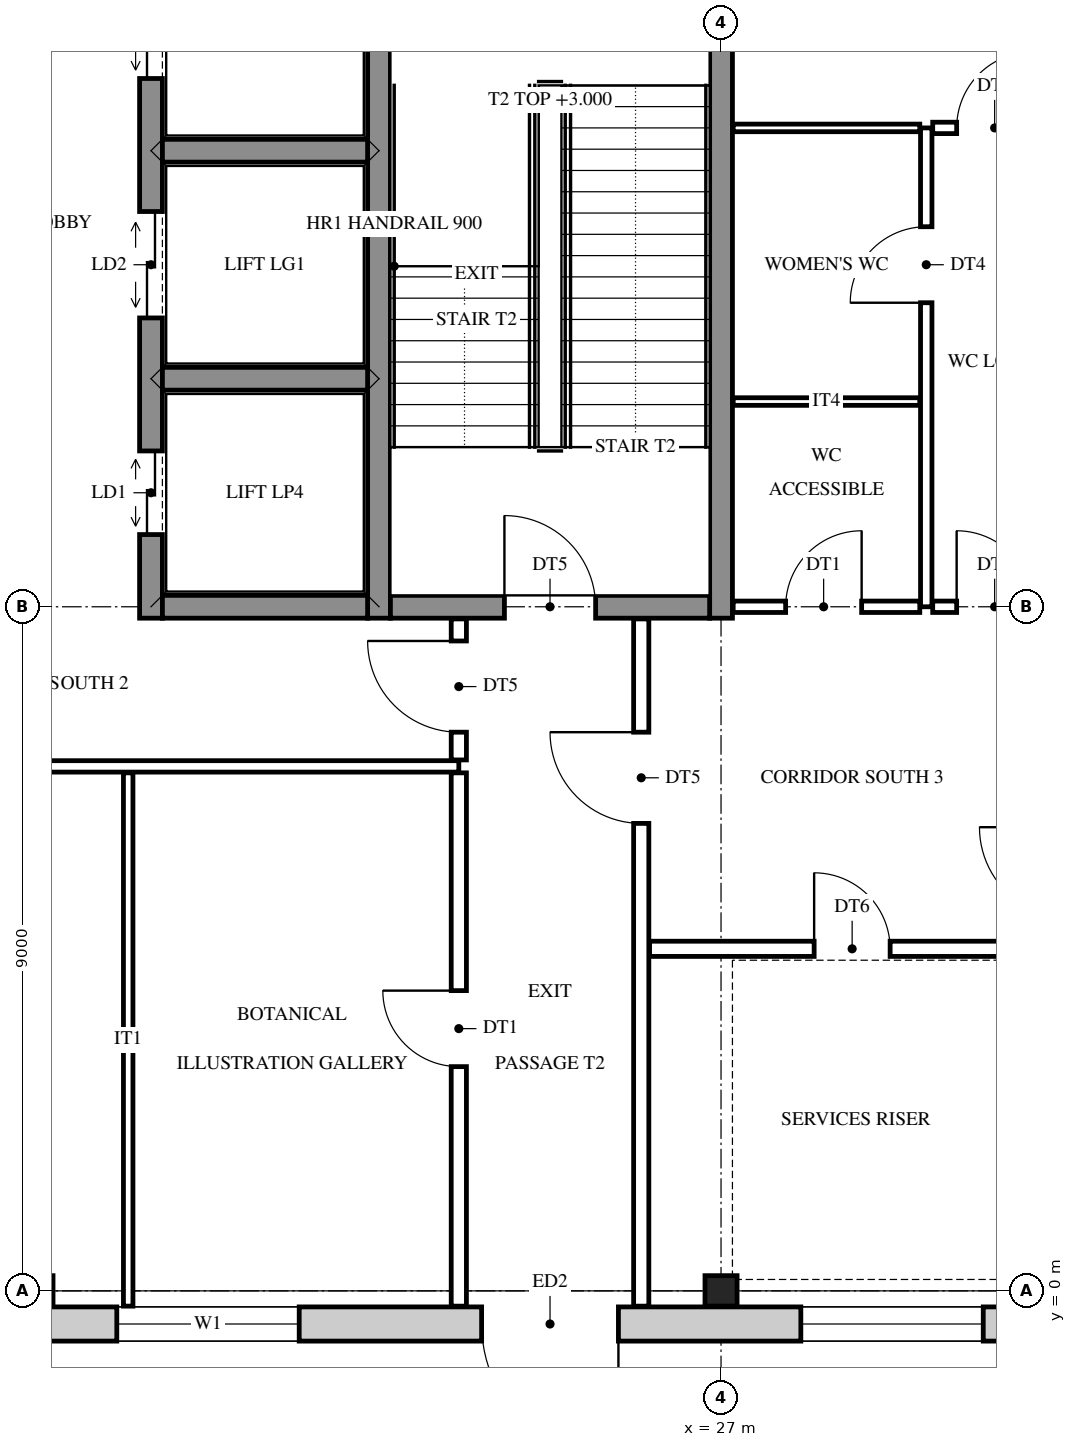
"""IFC4 building model, lengths in metres.
Left out: names, types, materials, properties, quantities, classifications, styles, units other than length and angle.
Written with IfcOpenShell. Run it as: python <this file> out.ifc"""

import sys

from ifc_helpers import new_model, si_unit, direction, frame, frame_2d, origin, origin_2d, place, context, subcontext, project, spatial, rectangle, i_section, extrude, element, fill, save


model = new_model("IFC4")
c1 = context("Model", 3, precision=1e-05, world=origin(), true_north=direction((0.0, 1.0)))
c2 = subcontext(c1, "Body", "Model", "MODEL_VIEW")
j1 = project(units=[si_unit("LENGTHUNIT", "METRE"), si_unit("PLANEANGLEUNIT", "RADIAN")], contexts=[c1])
p1 = place(None, origin())
s1 = spatial("IfcSite", under=j1, at=p1, CompositionType="ELEMENT")
p2 = place(p1, origin())
s2 = spatial("IfcBuilding", under=s1, at=p2, CompositionType="ELEMENT")
p3 = place(p2, origin())
s3 = spatial("IfcBuildingStorey", under=s2, at=p3, CompositionType="ELEMENT", Elevation=0.0)
for number, where, z_axis, x_axis in (
    (1, (18.0, 0.0, 0.0), (0.0, 0.0, 1.0), (0.0, 1.0, 0.0)),
    (2, (27.0, 0.0, 0.0), (0.0, 0.0, 1.0), (0.0, 1.0, 0.0)),
):
    element("IfcColumn", number, at=place(p3, frame(where, z_axis=z_axis, x_axis=x_axis)), inside=s3, PredefinedType="COLUMN", context=c2, shape_type="SweptSolid", body=[
        extrude(i_section(OverallWidth=0.4, OverallDepth=0.422, WebThickness=0.028, FlangeThickness=0.036, at=origin_2d()), origin(), (0.0, 0.0, 1.0), 6.0),
    ])
p4 = place(p3, frame((19.5, 8.85, 0.0), z_axis=(0.0, 0.0, 1.0), x_axis=(0.0, 1.0, 0.0)))
e3 = element("IfcWall", 3, at=p4, inside=s3, PredefinedType="SHEAR", context=c2, shape_type="SweptSolid", body=[
    extrude(rectangle(XDim=9.3, YDim=0.3, at=frame_2d((4.65, 0.0))), origin(), (0.0, 0.0, 1.0), 6.0),
])
p5 = place(p4, frame((1.1, 0.0, 0.0)))
e4 = element("IfcOpeningElement", 4, at=p5, cuts=e3, PredefinedType="OPENING", context=c2, shape_type="SweptSolid", body=[
    extrude(rectangle(XDim=1.1, YDim=2.1, at=frame_2d((0.55, 1.05))), frame((0.0, 0.16, 0.0), z_axis=(0.0, -1.0, 0.0), x_axis=(1.0, 0.0, 0.0)), (0.0, 0.0, 1.0), 0.32),
])
p6 = place(p4, frame((3.95, 0.0, 0.0)))
e5 = element("IfcOpeningElement", 5, at=p6, cuts=e3, PredefinedType="OPENING", context=c2, shape_type="SweptSolid", body=[
    extrude(rectangle(XDim=1.4, YDim=2.1, at=frame_2d((0.7, 1.05))), frame((0.0, 0.16, 0.0), z_axis=(0.0, -1.0, 0.0), x_axis=(1.0, 0.0, 0.0)), (0.0, 0.0, 1.0), 0.32),
])
p7 = place(p4, frame((7.1, 0.0, 0.0)))
e6 = element("IfcOpeningElement", 6, at=p7, cuts=e3, PredefinedType="OPENING", context=c2, shape_type="SweptSolid", body=[
    extrude(rectangle(XDim=1.1, YDim=2.1, at=frame_2d((0.55, 1.05))), frame((0.0, 0.16, 0.0), z_axis=(0.0, -1.0, 0.0), x_axis=(1.0, 0.0, 0.0)), (0.0, 0.0, 1.0), 0.32),
])
for number, where, z_axis, x_axis in (
    (7, (22.5, 8.85, 0.0), (0.0, 0.0, 1.0), (0.0, 1.0, 0.0)),
    (8, (27.0, 8.85, 0.0), (0.0, 0.0, 1.0), (0.0, 1.0, 0.0)),
):
    element("IfcWall", number, at=place(p3, frame(where, z_axis=z_axis, x_axis=x_axis)), inside=s3, PredefinedType="SHEAR", context=c2, shape_type="SweptSolid", body=[
        extrude(rectangle(XDim=9.3, YDim=0.3, at=frame_2d((4.65, 0.0))), origin(), (0.0, 0.0, 1.0), 6.0),
    ])
p8 = place(p3, frame((19.65, 9.0, 0.0), z_axis=(0.0, 0.0, 1.0), x_axis=(1.0, 0.0, 0.0)))
e9 = element("IfcWall", 9, at=p8, inside=s3, PredefinedType="SHEAR", context=c2, shape_type="SweptSolid", body=[
    extrude(rectangle(XDim=2.7, YDim=0.3, at=frame_2d((1.35, 0.0))), origin(), (0.0, 0.0, 1.0), 6.0),
])
p9 = place(p3, frame((22.65, 9.0, 0.0), z_axis=(0.0, 0.0, 1.0), x_axis=(1.0, 0.0, 0.0)))
e10 = element("IfcWall", 10, at=p9, inside=s3, PredefinedType="SHEAR", context=c2, shape_type="SweptSolid", body=[
    extrude(rectangle(XDim=4.2, YDim=0.3, at=frame_2d((2.1, 0.0))), origin(), (0.0, 0.0, 1.0), 6.0),
])
p10 = place(p9, frame((1.5, 0.0, 0.0)))
e11 = element("IfcOpeningElement", 11, at=p10, cuts=e10, PredefinedType="OPENING", context=c2, shape_type="SweptSolid", body=[
    extrude(rectangle(XDim=1.2, YDim=2.1, at=frame_2d((0.6, 1.05))), frame((0.0, 0.16, 0.0), z_axis=(0.0, -1.0, 0.0), x_axis=(1.0, 0.0, 0.0)), (0.0, 0.0, 1.0), 0.32),
])
for number, where, z_axis, x_axis in (
    (12, (19.65, 12.0, 0.0), (0.0, 0.0, 1.0), (1.0, 0.0, 0.0)),
    (13, (19.65, 15.0, 0.0), (0.0, 0.0, 1.0), (1.0, 0.0, 0.0)),
):
    element("IfcWall", number, at=place(p3, frame(where, z_axis=z_axis, x_axis=x_axis)), inside=s3, PredefinedType="SHEAR", context=c2, shape_type="SweptSolid", body=[
        extrude(rectangle(XDim=2.7, YDim=0.3, at=frame_2d((1.35, 0.0))), origin(), (0.0, 0.0, 1.0), 6.0),
    ])
p11 = place(p3, frame((32.15, -0.436, 0.0), z_axis=(0.0, 0.0, 1.0), x_axis=(-1.0, 0.0, 0.0)))
e14 = element("IfcWall", 14, at=p11, inside=s3, PredefinedType="STANDARD", context=c2, shape_type="SweptSolid", body=[
    extrude(rectangle(XDim=32.8, YDim=0.45, at=frame_2d((16.4, 0.0))), origin(), (0.0, 0.0, 1.0), 6.0),
])
p12 = place(p11, frame((15.55, 0.0, 0.012)))
e15 = element("IfcOpeningElement", 15, at=p12, cuts=e14, PredefinedType="OPENING", context=c2, shape_type="SweptSolid", body=[
    extrude(rectangle(XDim=3.0, YDim=2.4, at=frame_2d((1.5, 1.2))), frame((0.0, 0.235, 0.0), z_axis=(0.0, -1.0, 0.0), x_axis=(1.0, 0.0, 0.0)), (0.0, 0.0, 1.0), 0.47),
])
p13 = place(p11, frame((20.0, 0.0, 0.012)))
e16 = element("IfcOpeningElement", 16, at=p13, cuts=e14, PredefinedType="OPENING", context=c2, shape_type="SweptSolid", body=[
    extrude(rectangle(XDim=1.8, YDim=2.4, at=frame_2d((0.9, 1.2))), frame((0.0, 0.235, 0.0), z_axis=(0.0, -1.0, 0.0), x_axis=(1.0, 0.0, 0.0)), (0.0, 0.0, 1.0), 0.47),
])
p14 = place(p11, frame((6.5, 0.0, 0.012)))
e17 = element("IfcOpeningElement", 17, at=p14, cuts=e14, PredefinedType="OPENING", context=c2, shape_type="SweptSolid", body=[
    extrude(rectangle(XDim=1.8, YDim=2.4, at=frame_2d((0.9, 1.2))), frame((0.0, 0.235, 0.0), z_axis=(0.0, -1.0, 0.0), x_axis=(1.0, 0.0, 0.0)), (0.0, 0.0, 1.0), 0.47),
])
p15 = place(p11, frame((28.7, 0.0, 0.9)))
e18 = element("IfcOpeningElement", 18, at=p15, cuts=e14, PredefinedType="OPENING", context=c2, shape_type="SweptSolid", body=[
    extrude(rectangle(XDim=2.4, YDim=3.5, at=frame_2d((1.2, 1.75))), frame((0.0, 0.235, 0.0), z_axis=(0.0, -1.0, 0.0), x_axis=(1.0, 0.0, 0.0)), (0.0, 0.0, 1.0), 0.47),
])
p16 = place(p11, frame((24.2, 0.0, 0.9)))
e19 = element("IfcOpeningElement", 19, at=p16, cuts=e14, PredefinedType="OPENING", context=c2, shape_type="SweptSolid", body=[
    extrude(rectangle(XDim=2.4, YDim=3.5, at=frame_2d((1.2, 1.75))), frame((0.0, 0.235, 0.0), z_axis=(0.0, -1.0, 0.0), x_axis=(1.0, 0.0, 0.0)), (0.0, 0.0, 1.0), 0.47),
])
p17 = place(p11, frame((10.7, 0.0, 0.9)))
e20 = element("IfcOpeningElement", 20, at=p17, cuts=e14, PredefinedType="OPENING", context=c2, shape_type="SweptSolid", body=[
    extrude(rectangle(XDim=2.4, YDim=3.5, at=frame_2d((1.2, 1.75))), frame((0.0, 0.235, 0.0), z_axis=(0.0, -1.0, 0.0), x_axis=(1.0, 0.0, 0.0)), (0.0, 0.0, 1.0), 0.47),
])
p18 = place(p11, frame((1.7, 0.0, 0.9)))
e21 = element("IfcOpeningElement", 21, at=p18, cuts=e14, PredefinedType="OPENING", context=c2, shape_type="SweptSolid", body=[
    extrude(rectangle(XDim=2.4, YDim=3.5, at=frame_2d((1.2, 1.75))), frame((0.0, 0.235, 0.0), z_axis=(0.0, -1.0, 0.0), x_axis=(1.0, 0.0, 0.0)), (0.0, 0.0, 1.0), 0.47),
])
p19 = place(p3, frame((19.2, -0.201, 0.0), z_axis=(0.0, 0.0, 1.0), x_axis=(0.0, 1.0, 0.0)))
e22 = element("IfcWall", 22, at=p19, inside=s3, PredefinedType="PARTITIONING", context=c2, shape_type="SweptSolid", body=[
    extrude(rectangle(XDim=7.016, YDim=0.125, at=frame_2d((3.508, 0.0))), origin(), (0.0, 0.0, 1.0), 5.218),
])
p20 = place(p3, frame((23.55, -0.201, 0.0), z_axis=(0.0, 0.0, 1.0), x_axis=(0.0, 1.0, 0.0)))
e23 = element("IfcWall", 23, at=p20, inside=s3, PredefinedType="PARTITIONING", context=c2, shape_type="SweptSolid", body=[
    extrude(rectangle(XDim=7.016, YDim=0.2, at=frame_2d((3.508, 0.0))), origin(), (0.0, 0.0, 1.0), 5.218),
])
p21 = place(p20, frame((3.151, 0.0, 0.0)))
e24 = element("IfcOpeningElement", 24, at=p21, cuts=e23, PredefinedType="OPENING", context=c2, shape_type="SweptSolid", body=[
    extrude(rectangle(XDim=1.0, YDim=2.1, at=frame_2d((0.5, 1.05))), frame((0.0, 0.11, 0.0), z_axis=(0.0, -1.0, 0.0), x_axis=(1.0, 0.0, 0.0)), (0.0, 0.0, 1.0), 0.22),
])
p22 = place(p3, frame((23.55, 6.985, 0.0), z_axis=(0.0, 0.0, 1.0), x_axis=(0.0, 1.0, 0.0)))
e25 = element("IfcWall", 25, at=p22, inside=s3, PredefinedType="PARTITIONING", context=c2, shape_type="SweptSolid", body=[
    extrude(rectangle(XDim=1.855, YDim=0.2, at=frame_2d((0.927, 0.0))), origin(), (0.0, 0.0, 1.0), 5.218),
])
p23 = place(p22, frame((0.365, 0.0, 0.0)))
e26 = element("IfcOpeningElement", 26, at=p23, cuts=e25, PredefinedType="OPENING", context=c2, shape_type="SweptSolid", body=[
    extrude(rectangle(XDim=1.2, YDim=2.1, at=frame_2d((0.6, 1.05))), frame((0.0, 0.11, 0.0), z_axis=(0.0, -1.0, 0.0), x_axis=(1.0, 0.0, 0.0)), (0.0, 0.0, 1.0), 0.22),
])
p24 = place(p3, frame((25.95, -0.201, 0.0), z_axis=(0.0, 0.0, 1.0), x_axis=(0.0, 1.0, 0.0)))
e27 = element("IfcWall", 27, at=p24, inside=s3, PredefinedType="PARTITIONING", context=c2, shape_type="SweptSolid", body=[
    extrude(rectangle(XDim=9.041, YDim=0.2, at=frame_2d((4.521, 0.0))), origin(), (0.0, 0.0, 1.0), 5.218),
])
p25 = place(p24, frame((6.351, 0.0, 0.0)))
e28 = element("IfcOpeningElement", 28, at=p25, cuts=e27, PredefinedType="OPENING", context=c2, shape_type="SweptSolid", body=[
    extrude(rectangle(XDim=1.2, YDim=2.1, at=frame_2d((0.6, 1.05))), frame((0.0, 0.11, 0.0), z_axis=(0.0, -1.0, 0.0), x_axis=(1.0, 0.0, 0.0)), (0.0, 0.0, 1.0), 0.22),
])
p26 = place(p3, frame((29.7, 9.0, 0.0), z_axis=(0.0, 0.0, 1.0), x_axis=(0.0, 1.0, 0.0)))
e29 = element("IfcWall", 29, at=p26, inside=s3, PredefinedType="PARTITIONING", context=c2, shape_type="SweptSolid", body=[
    extrude(rectangle(XDim=6.3, YDim=0.15, at=frame_2d((3.15, 0.0))), origin(), (0.0, 0.0, 1.0), 5.218),
])
p27 = place(p26, frame((4.0, 0.0, 0.0)))
e30 = element("IfcOpeningElement", 30, at=p27, cuts=e29, PredefinedType="OPENING", context=c2, shape_type="SweptSolid", body=[
    extrude(rectangle(XDim=1.0, YDim=2.1, at=frame_2d((0.5, 1.05))), frame((0.0, 0.085, 0.0), z_axis=(0.0, -1.0, 0.0), x_axis=(1.0, 0.0, 0.0)), (0.0, 0.0, 1.0), 0.17),
])
p28 = place(p3, frame((26.06, 4.5, 0.0), z_axis=(0.0, 0.0, 1.0), x_axis=(1.0, 0.0, 0.0)))
e31 = element("IfcWall", 31, at=p28, inside=s3, PredefinedType="PARTITIONING", context=c2, shape_type="SweptSolid", body=[
    extrude(rectangle(XDim=5.43, YDim=0.2, at=frame_2d((2.715, 0.0))), origin(), (0.0, 0.0, 1.0), 5.218),
])
p29 = place(p28, frame((2.165, 0.0, 0.0)))
e32 = element("IfcOpeningElement", 32, at=p29, cuts=e31, PredefinedType="OPENING", context=c2, shape_type="SweptSolid", body=[
    extrude(rectangle(XDim=1.0, YDim=2.1, at=frame_2d((0.5, 1.05))), frame((0.0, 0.11, 0.0), z_axis=(0.0, -1.0, 0.0), x_axis=(1.0, 0.0, 0.0)), (0.0, 0.0, 1.0), 0.22),
])
p30 = place(p3, frame((12.45, 6.9, 0.0), z_axis=(0.0, 0.0, 1.0), x_axis=(1.0, 0.0, 0.0)))
e33 = element("IfcWall", 33, at=p30, inside=s3, PredefinedType="PARTITIONING", context=c2, shape_type="SweptSolid", body=[
    extrude(rectangle(XDim=11.1, YDim=0.15, at=frame_2d((5.55, 0.0))), origin(), (0.0, 0.0, 1.0), 5.218),
])
p31 = place(p3, frame((27.16, 9.0, 0.0), z_axis=(0.0, 0.0, 1.0), x_axis=(1.0, 0.0, 0.0)))
e34 = element("IfcWall", 34, at=p31, inside=s3, PredefinedType="PARTITIONING", context=c2, shape_type="SweptSolid", body=[
    extrude(rectangle(XDim=2.455, YDim=0.15, at=frame_2d((1.228, 0.0))), origin(), (0.0, 0.0, 1.0), 5.218),
])
p32 = place(p31, frame((0.69, 0.0, 0.0)))
e35 = element("IfcOpeningElement", 35, at=p32, cuts=e34, PredefinedType="OPENING", context=c2, shape_type="SweptSolid", body=[
    extrude(rectangle(XDim=1.0, YDim=2.1, at=frame_2d((0.5, 1.05))), frame((0.0, 0.085, 0.0), z_axis=(0.0, -1.0, 0.0), x_axis=(1.0, 0.0, 0.0)), (0.0, 0.0, 1.0), 0.17),
])
p33 = place(p3, frame((29.785, 9.0, 0.0), z_axis=(0.0, 0.0, 1.0), x_axis=(1.0, 0.0, 0.0)))
e36 = element("IfcWall", 36, at=p33, inside=s3, PredefinedType="PARTITIONING", context=c2, shape_type="SweptSolid", body=[
    extrude(rectangle(XDim=1.505, YDim=0.15, at=frame_2d((0.752, 0.0))), origin(), (0.0, 0.0, 1.0), 5.218),
])
p34 = place(p33, frame((0.315, 0.0, 0.0)))
e37 = element("IfcOpeningElement", 37, at=p34, cuts=e36, PredefinedType="OPENING", context=c2, shape_type="SweptSolid", body=[
    extrude(rectangle(XDim=1.0, YDim=2.1, at=frame_2d((0.5, 1.05))), frame((0.0, 0.085, 0.0), z_axis=(0.0, -1.0, 0.0), x_axis=(1.0, 0.0, 0.0)), (0.0, 0.0, 1.0), 0.17),
])
for number, where, z_axis, x_axis in (
    (38, (27.16, 11.7, 0.0), (0.0, 0.0, 1.0), (1.0, 0.0, 0.0)),
    (39, (27.16, 15.3, 0.0), (0.0, 0.0, 1.0), (1.0, 0.0, 0.0)),
):
    element("IfcWall", number, at=place(p3, frame(where, z_axis=z_axis, x_axis=x_axis)), inside=s3, PredefinedType="PARTITIONING", context=c2, shape_type="SweptSolid", body=[
        extrude(rectangle(XDim=2.455, YDim=0.1, at=frame_2d((1.228, 0.0))), origin(), (0.0, 0.0, 1.0), 5.218),
    ])
p35 = place(p3, frame((29.785, 15.3, 0.0), z_axis=(0.0, 0.0, 1.0), x_axis=(1.0, 0.0, 0.0)))
e40 = element("IfcWall", 40, at=p35, inside=s3, PredefinedType="PARTITIONING", context=c2, shape_type="SweptSolid", body=[
    extrude(rectangle(XDim=1.705, YDim=0.15, at=frame_2d((0.853, 0.0))), origin(), (0.0, 0.0, 1.0), 5.218),
])
p36 = place(p35, frame((0.315, 0.0, 0.0)))
e41 = element("IfcOpeningElement", 41, at=p36, cuts=e40, PredefinedType="OPENING", context=c2, shape_type="SweptSolid", body=[
    extrude(rectangle(XDim=1.0, YDim=2.1, at=frame_2d((0.5, 1.05))), frame((0.0, 0.085, 0.0), z_axis=(0.0, -1.0, 0.0), x_axis=(1.0, 0.0, 0.0)), (0.0, 0.0, 1.0), 0.17),
])
p37 = place(p14, origin())
e42 = element("IfcDoor", 42, at=p37, inside=s3, OperationType="DOUBLE_DOOR_DOUBLE_SWING", PredefinedType="DOOR", context=c2, shape_type="SweptSolid", body=[
    extrude(rectangle(XDim=1.8, YDim=2.4, at=frame_2d((0.9, 1.2))), frame((0.0, 0.025, 0.0), z_axis=(0.0, -1.0, 0.0), x_axis=(1.0, 0.0, 0.0)), (0.0, 0.0, 1.0), 0.05),
])
fill(e17, e42)
p38 = place(p17, origin())
e43 = element("IfcWindow", 43, at=p38, inside=s3, PartitioningType="SINGLE_PANEL", PredefinedType="WINDOW", context=c2, shape_type="SweptSolid", body=[
    extrude(rectangle(XDim=2.4, YDim=3.5, at=frame_2d((1.2, 1.75))), frame((0.0, 0.03, 0.0), z_axis=(0.0, -1.0, 0.0), x_axis=(1.0, 0.0, 0.0)), (0.0, 0.0, 1.0), 0.06),
])
fill(e20, e43)
p39 = place(p18, origin())
e44 = element("IfcWindow", 44, at=p39, inside=s3, PartitioningType="SINGLE_PANEL", PredefinedType="WINDOW", context=c2, shape_type="SweptSolid", body=[
    extrude(rectangle(XDim=2.4, YDim=3.5, at=frame_2d((1.2, 1.75))), frame((0.0, 0.03, 0.0), z_axis=(0.0, -1.0, 0.0), x_axis=(1.0, 0.0, 0.0)), (0.0, 0.0, 1.0), 0.06),
])
fill(e21, e44)
p40 = place(p10, origin())
e45 = element("IfcDoor", 45, at=p40, inside=s3, OperationType="SINGLE_SWING_LEFT", PredefinedType="DOOR", context=c2, shape_type="SweptSolid", body=[
    extrude(rectangle(XDim=1.2, YDim=2.1, at=frame_2d((0.6, 1.05))), frame((0.0, 0.025, 0.0), z_axis=(0.0, -1.0, 0.0), x_axis=(1.0, 0.0, 0.0)), (0.0, 0.0, 1.0), 0.05),
])
fill(e11, e45)
p41 = place(p32, origin())
e46 = element("IfcDoor", 46, at=p41, inside=s3, OperationType="SINGLE_SWING_RIGHT", PredefinedType="DOOR", context=c2, shape_type="SweptSolid", body=[
    extrude(rectangle(XDim=1.0, YDim=2.1, at=frame_2d((0.5, 1.05))), frame((0.0, 0.025, 0.0), z_axis=(0.0, -1.0, 0.0), x_axis=(1.0, 0.0, 0.0)), (0.0, 0.0, 1.0), 0.05),
])
fill(e35, e46)
p42 = place(p27, origin())
e47 = element("IfcDoor", 47, at=p42, inside=s3, OperationType="SINGLE_SWING_LEFT", PredefinedType="DOOR", context=c2, shape_type="SweptSolid", body=[
    extrude(rectangle(XDim=1.0, YDim=2.1, at=frame_2d((0.5, 1.05))), frame((0.0, 0.025, 0.0), z_axis=(0.0, -1.0, 0.0), x_axis=(1.0, 0.0, 0.0)), (0.0, 0.0, 1.0), 0.05),
])
fill(e30, e47)
p43 = place(p36, origin())
e48 = element("IfcDoor", 48, at=p43, inside=s3, OperationType="SINGLE_SWING_RIGHT", PredefinedType="DOOR", context=c2, shape_type="SweptSolid", body=[
    extrude(rectangle(XDim=1.0, YDim=2.1, at=frame_2d((0.5, 1.05))), frame((0.0, 0.025, 0.0), z_axis=(0.0, -1.0, 0.0), x_axis=(1.0, 0.0, 0.0)), (0.0, 0.0, 1.0), 0.05),
])
fill(e41, e48)
p44 = place(p34, origin())
e49 = element("IfcDoor", 49, at=p44, inside=s3, OperationType="SINGLE_SWING_LEFT", PredefinedType="DOOR", context=c2, shape_type="SweptSolid", body=[
    extrude(rectangle(XDim=1.0, YDim=2.1, at=frame_2d((0.5, 1.05))), frame((0.0, 0.025, 0.0), z_axis=(0.0, -1.0, 0.0), x_axis=(1.0, 0.0, 0.0)), (0.0, 0.0, 1.0), 0.05),
])
fill(e37, e49)
p45 = place(p29, frame((1.0, 0.0, 0.0), z_axis=(0.0, 0.0, 1.0), x_axis=(-1.0, 0.0, 0.0)))
e50 = element("IfcDoor", 50, at=p45, inside=s3, OperationType="SINGLE_SWING_LEFT", PredefinedType="DOOR", context=c2, shape_type="SweptSolid", body=[
    extrude(rectangle(XDim=1.0, YDim=2.1, at=frame_2d((0.5, 1.05))), frame((0.0, 0.025, 0.0), z_axis=(0.0, -1.0, 0.0), x_axis=(1.0, 0.0, 0.0)), (0.0, 0.0, 1.0), 0.05),
])
fill(e32, e50)
p46 = place(p23, frame((1.2, 0.0, 0.0), z_axis=(0.0, 0.0, 1.0), x_axis=(-1.0, 0.0, 0.0)))
e51 = element("IfcDoor", 51, at=p46, inside=s3, OperationType="SINGLE_SWING_RIGHT", PredefinedType="DOOR", context=c2, shape_type="SweptSolid", body=[
    extrude(rectangle(XDim=1.2, YDim=2.1, at=frame_2d((0.6, 1.05))), frame((0.0, 0.025, 0.0), z_axis=(0.0, -1.0, 0.0), x_axis=(1.0, 0.0, 0.0)), (0.0, 0.0, 1.0), 0.05),
])
fill(e26, e51)
p47 = place(p25, origin())
e52 = element("IfcDoor", 52, at=p47, inside=s3, OperationType="SINGLE_SWING_RIGHT", PredefinedType="DOOR", context=c2, shape_type="SweptSolid", body=[
    extrude(rectangle(XDim=1.2, YDim=2.1, at=frame_2d((0.6, 1.05))), frame((0.0, 0.025, 0.0), z_axis=(0.0, -1.0, 0.0), x_axis=(1.0, 0.0, 0.0)), (0.0, 0.0, 1.0), 0.05),
])
fill(e28, e52)
p48 = place(p21, origin())
e53 = element("IfcDoor", 53, at=p48, inside=s3, OperationType="SINGLE_SWING_RIGHT", PredefinedType="DOOR", context=c2, shape_type="SweptSolid", body=[
    extrude(rectangle(XDim=1.0, YDim=2.1, at=frame_2d((0.5, 1.05))), frame((0.0, 0.025, 0.0), z_axis=(0.0, -1.0, 0.0), x_axis=(1.0, 0.0, 0.0)), (0.0, 0.0, 1.0), 0.05),
])
fill(e24, e53)
p49 = place(p5, origin())
e54 = element("IfcDoor", 54, at=p49, inside=s3, OperationType="DOUBLE_DOOR_SLIDING", PredefinedType="DOOR", context=c2, shape_type="SweptSolid", body=[
    extrude(rectangle(XDim=1.1, YDim=2.1, at=frame_2d((0.55, 1.05))), frame((0.0, 0.025, 0.0), z_axis=(0.0, -1.0, 0.0), x_axis=(1.0, 0.0, 0.0)), (0.0, 0.0, 1.0), 0.05),
])
fill(e4, e54)
p50 = place(p6, origin())
e55 = element("IfcDoor", 55, at=p50, inside=s3, OperationType="DOUBLE_DOOR_SLIDING", PredefinedType="DOOR", context=c2, shape_type="SweptSolid", body=[
    extrude(rectangle(XDim=1.4, YDim=2.1, at=frame_2d((0.7, 1.05))), frame((0.0, 0.025, 0.0), z_axis=(0.0, -1.0, 0.0), x_axis=(1.0, 0.0, 0.0)), (0.0, 0.0, 1.0), 0.05),
])
fill(e5, e55)
p51 = place(p7, origin())
e56 = element("IfcDoor", 56, at=p51, inside=s3, OperationType="DOUBLE_DOOR_SLIDING", PredefinedType="DOOR", context=c2, shape_type="SweptSolid", body=[
    extrude(rectangle(XDim=1.1, YDim=2.1, at=frame_2d((0.55, 1.05))), frame((0.0, 0.025, 0.0), z_axis=(0.0, -1.0, 0.0), x_axis=(1.0, 0.0, 0.0)), (0.0, 0.0, 1.0), 0.05),
])
fill(e6, e56)
save(model, sys.argv[1])
